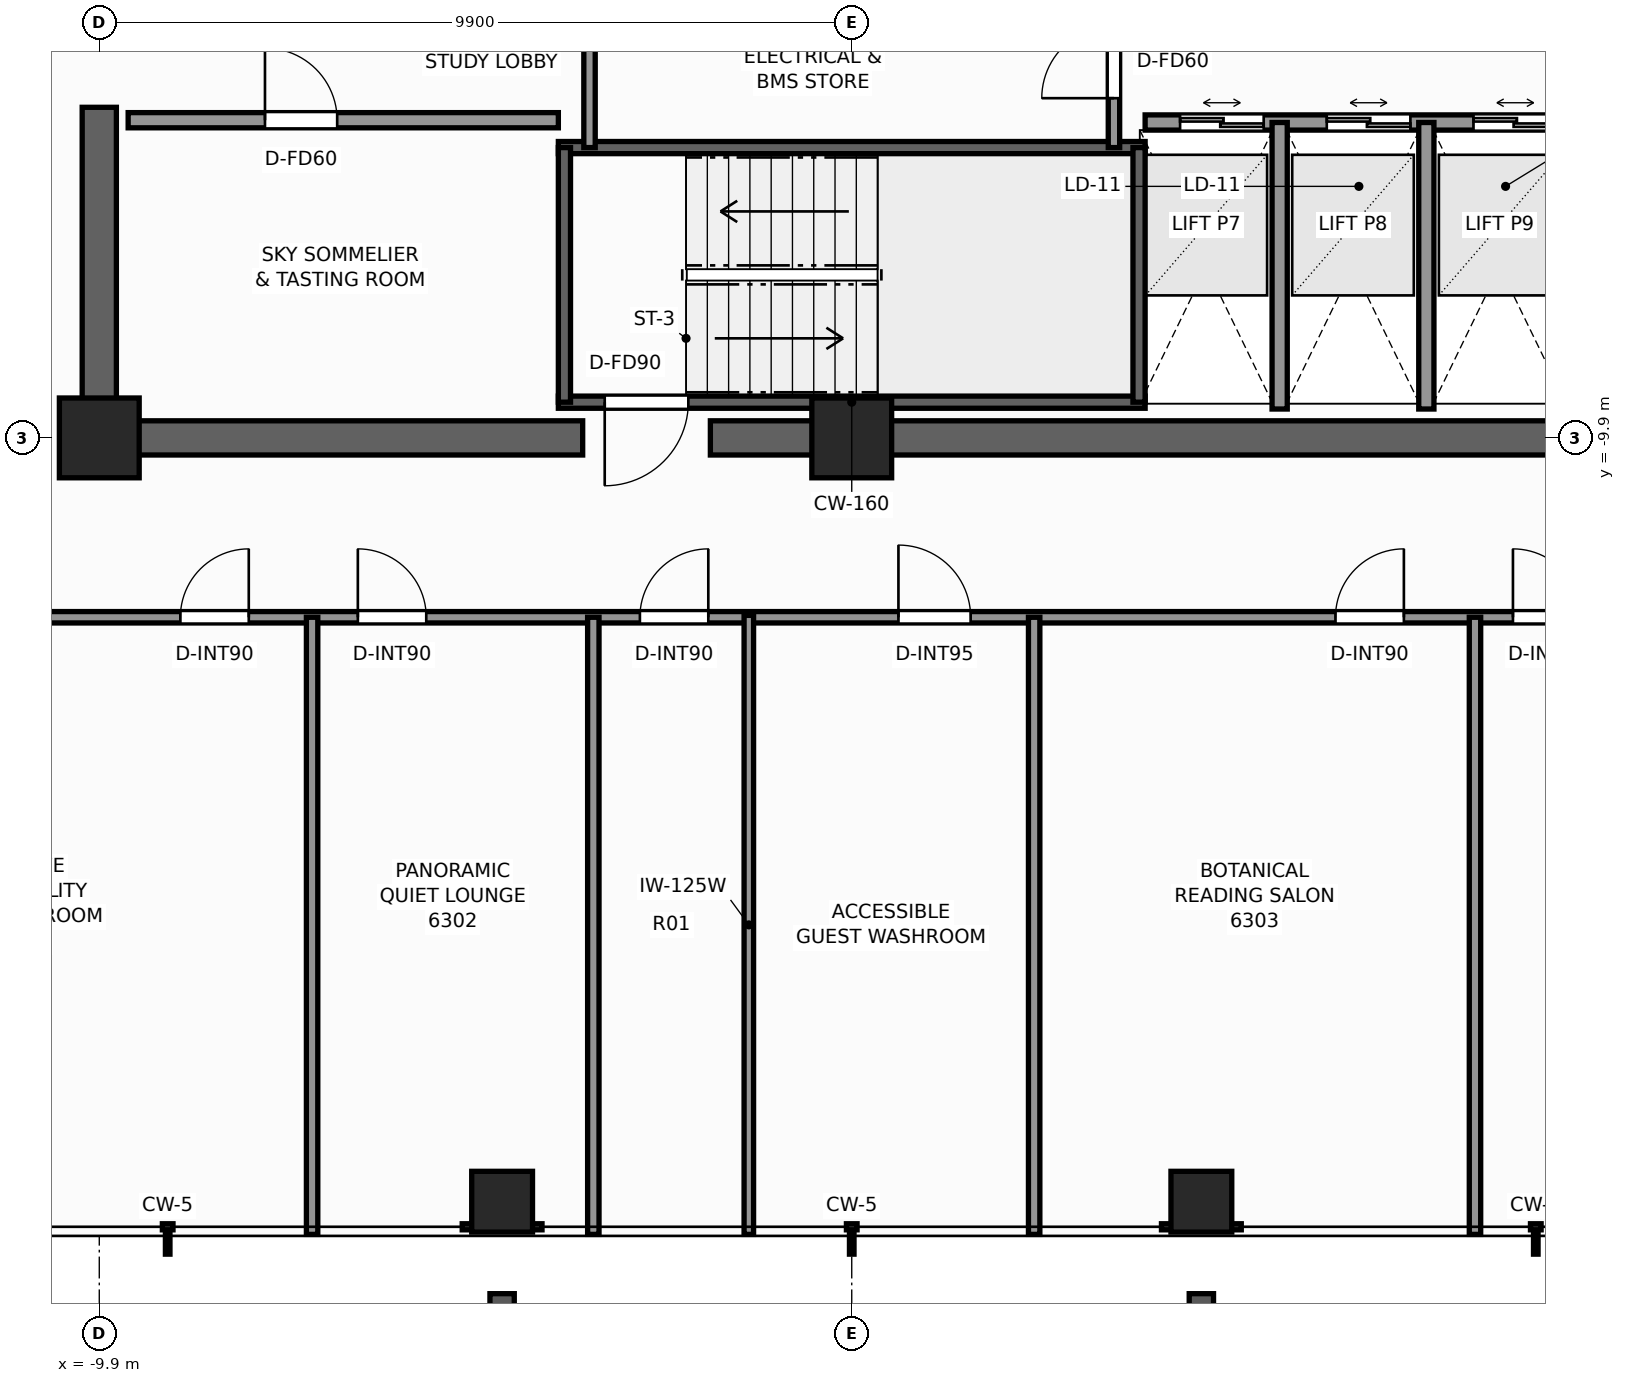
"""IFC4 building model, lengths in metres.
Left out: names, types, materials, properties, quantities, classifications, styles, units other than length and angle.
Written with IfcOpenShell. Run it as: python <this file> out.ifc"""

import sys

from ifc_helpers import new_model, si_unit, direction, frame, frame_2d, origin, origin_2d, place, context, subcontext, project, spatial, rectangle, extrude, element, fill, save


model = new_model("IFC4")
c1 = context("Model", 3, precision=1e-05, world=origin(), true_north=direction((0.0, 1.0)))
c2 = subcontext(c1, "Body", "Model", "MODEL_VIEW")
j1 = project(units=[si_unit("LENGTHUNIT", "METRE"), si_unit("PLANEANGLEUNIT", "RADIAN")], contexts=[c1])
p1 = place(None, origin())
s1 = spatial("IfcSite", under=j1, at=p1, CompositionType="ELEMENT")
p2 = place(p1, origin())
s2 = spatial("IfcBuilding", under=s1, at=p2, CompositionType="ELEMENT")
p3 = place(p2, frame((0.0, 0.0, 216.3)))
s3 = spatial("IfcBuildingStorey", under=s2, at=p3, CompositionType="ELEMENT", Elevation=216.3)
p4 = place(p3, frame((10.125, -9.9, 0.0), z_axis=(0.0, 0.0, 1.0), x_axis=(-1.0, 0.0, 0.0)))
e1 = element("IfcWall", 1, at=p4, inside=s3, PredefinedType="SHEAR", context=c2, shape_type="SweptSolid", body=[
    extrude(rectangle(XDim=11.985, YDim=0.45, at=frame_2d((5.993, 0.0))), origin(), (0.0, 0.0, 1.0), 3.3),
])
p5 = place(p3, frame((-3.54, -9.9, 0.0), z_axis=(0.0, 0.0, 1.0), x_axis=(-1.0, 0.0, 0.0)))
e2 = element("IfcWall", 2, at=p5, inside=s3, PredefinedType="SHEAR", context=c2, shape_type="SweptSolid", body=[
    extrude(rectangle(XDim=6.585, YDim=0.45, at=frame_2d((3.292, 0.0))), origin(), (0.0, 0.0, 1.0), 3.3),
])
p6 = place(p3, frame((-9.9, -9.675, 0.0), z_axis=(0.0, 0.0, 1.0), x_axis=(0.0, 1.0, 0.0)))
e3 = element("IfcWall", 3, at=p6, inside=s3, PredefinedType="SHEAR", context=c2, shape_type="SweptSolid", body=[
    extrude(rectangle(XDim=4.125, YDim=0.45, at=frame_2d((2.062, 0.0))), origin(), (0.0, 0.0, 1.0), 3.3),
])
for number, where, z_axis, x_axis in (
    (4, (-9.9, -9.9, 0.0), (0.0, 0.0, 1.0), (1.0, 0.0, 0.0)),
    (5, (0.0, -9.9, 0.0), (0.0, 0.0, 1.0), (1.0, 0.0, 0.0)),
):
    element("IfcColumn", number, at=place(p3, frame(where, z_axis=z_axis, x_axis=x_axis)), inside=s3, PredefinedType="COLUMN", context=c2, shape_type="SweptSolid", body=[
        extrude(rectangle(XDim=1.05, YDim=1.05, at=origin_2d()), origin(), (0.0, 0.0, 1.0), 3.3),
    ])
for number, where, z_axis, x_axis in (
    (6, (-4.6, -19.95, 0.0), (0.0, 0.0, 1.0), (1.0, 0.0, 0.0)),
    (7, (4.6, -19.95, 0.0), (0.0, 0.0, 1.0), (1.0, 0.0, 0.0)),
):
    element("IfcColumn", number, at=place(p3, frame(where, z_axis=z_axis, x_axis=x_axis)), inside=s3, PredefinedType="COLUMN", context=c2, shape_type="SweptSolid", body=[
        extrude(rectangle(XDim=0.8, YDim=0.8, at=origin_2d()), origin(), (0.0, 0.0, 1.0), 3.3),
    ])
p7 = place(p3, frame((3.86, -9.43, 0.0), z_axis=(0.0, 0.0, 1.0), x_axis=(-1.0, 0.0, 0.0)))
e8 = element("IfcWall", 8, at=p7, inside=s3, PredefinedType="SHEAR", context=c2, shape_type="SweptSolid", body=[
    extrude(rectangle(XDim=7.72, YDim=0.16, at=frame_2d((3.86, 0.0))), origin(), (0.0, 0.0, 1.0), 3.3),
])
p8 = place(p7, frame((6.01, 0.0, 0.0)))
e9 = element("IfcOpeningElement", 9, at=p8, cuts=e8, PredefinedType="OPENING", context=c2, shape_type="SweptSolid", body=[
    extrude(rectangle(XDim=1.1, YDim=2.2, at=frame_2d((0.55, 1.1))), frame((0.0, 0.09, 0.0), z_axis=(0.0, -1.0, 0.0), x_axis=(1.0, 0.0, 0.0)), (0.0, 0.0, 1.0), 0.18),
])
p9 = place(p3, frame((-3.86, -6.08, 0.0), z_axis=(0.0, 0.0, 1.0), x_axis=(1.0, 0.0, 0.0)))
e10 = element("IfcWall", 10, at=p9, inside=s3, PredefinedType="SHEAR", context=c2, shape_type="SweptSolid", body=[
    extrude(rectangle(XDim=7.72, YDim=0.16, at=frame_2d((3.86, 0.0))), origin(), (0.0, 0.0, 1.0), 3.3),
])
for number, where, z_axis, x_axis in (
    (11, (-3.78, -9.43, 0.0), (0.0, 0.0, 1.0), (0.0, 1.0, 0.0)),
    (12, (3.78, -9.43, 0.0), (0.0, 0.0, 1.0), (0.0, 1.0, 0.0)),
):
    element("IfcWall", number, at=place(p3, frame(where, z_axis=z_axis, x_axis=x_axis)), inside=s3, PredefinedType="SHEAR", context=c2, shape_type="SweptSolid", body=[
        extrude(rectangle(XDim=3.35, YDim=0.16, at=frame_2d((1.675, 0.0))), origin(), (0.0, 0.0, 1.0), 3.3),
    ])
p10 = place(p3, frame((-9.52, -5.72, 0.0), z_axis=(0.0, 0.0, 1.0), x_axis=(1.0, 0.0, 0.0)))
e13 = element("IfcWall", 13, at=p10, inside=s3, PredefinedType="SOLIDWALL", context=c2, shape_type="SweptSolid", body=[
    extrude(rectangle(XDim=5.66, YDim=0.2, at=frame_2d((2.83, 0.0))), origin(), (0.0, 0.0, 1.0), 3.08),
])
p11 = place(p10, frame((1.8, 0.0, 0.0)))
e14 = element("IfcOpeningElement", 14, at=p11, cuts=e13, PredefinedType="OPENING", context=c2, shape_type="SweptSolid", body=[
    extrude(rectangle(XDim=0.95, YDim=2.06, at=frame_2d((0.475, 1.03))), frame((0.0, 0.11, 0.0), z_axis=(0.0, -1.0, 0.0), x_axis=(1.0, 0.0, 0.0)), (0.0, 0.0, 1.0), 0.22),
])
p12 = place(p3, frame((3.86, -5.75, 0.0), z_axis=(0.0, 0.0, 1.0), x_axis=(1.0, 0.0, 0.0)))
e15 = element("IfcWall", 15, at=p12, inside=s3, PredefinedType="SOLIDWALL", context=c2, shape_type="SweptSolid", body=[
    extrude(rectangle(XDim=5.66, YDim=0.2, at=frame_2d((2.83, 0.0))), origin(), (0.0, 0.0, 1.0), 3.08),
])
p13 = place(p12, frame((0.46, 0.0, 0.0)))
e16 = element("IfcOpeningElement", 16, at=p13, cuts=e15, PredefinedType="OPENING", context=c2, shape_type="SweptSolid", body=[
    extrude(rectangle(XDim=1.1, YDim=2.2, at=frame_2d((0.55, 1.1))), frame((0.0, 0.11, 0.0), z_axis=(0.0, -1.0, 0.0), x_axis=(1.0, 0.0, 0.0)), (0.0, 0.0, 1.0), 0.22),
])
p14 = place(p12, frame((2.39, 0.0, 0.0)))
e17 = element("IfcOpeningElement", 17, at=p14, cuts=e15, PredefinedType="OPENING", context=c2, shape_type="SweptSolid", body=[
    extrude(rectangle(XDim=1.1, YDim=2.2, at=frame_2d((0.55, 1.1))), frame((0.0, 0.11, 0.0), z_axis=(0.0, -1.0, 0.0), x_axis=(1.0, 0.0, 0.0)), (0.0, 0.0, 1.0), 0.22),
])
p15 = place(p12, frame((4.32, 0.0, 0.0)))
e18 = element("IfcOpeningElement", 18, at=p15, cuts=e15, PredefinedType="OPENING", context=c2, shape_type="SweptSolid", body=[
    extrude(rectangle(XDim=1.1, YDim=2.2, at=frame_2d((0.55, 1.1))), frame((0.0, 0.11, 0.0), z_axis=(0.0, -1.0, 0.0), x_axis=(1.0, 0.0, 0.0)), (0.0, 0.0, 1.0), 0.22),
])
for number, where, z_axis, x_axis in (
    (19, (5.63, -9.52, 0.0), (0.0, 0.0, 1.0), (0.0, 1.0, 0.0)),
    (20, (7.56, -9.52, 0.0), (0.0, 0.0, 1.0), (0.0, 1.0, 0.0)),
):
    element("IfcWall", number, at=place(p3, frame(where, z_axis=z_axis, x_axis=x_axis)), inside=s3, PredefinedType="SOLIDWALL", context=c2, shape_type="SweptSolid", body=[
        extrude(rectangle(XDim=3.77, YDim=0.2, at=frame_2d((1.885, 0.0))), origin(), (0.0, 0.0, 1.0), 3.08),
    ])
p16 = place(p3, frame((3.45, -6.08, 0.0), z_axis=(0.0, 0.0, 1.0), x_axis=(0.0, 1.0, 0.0)))
e21 = element("IfcWall", 21, at=p16, inside=s3, PredefinedType="PARTITIONING", context=c2, shape_type="SweptSolid", body=[
    extrude(rectangle(XDim=2.36, YDim=0.15, at=frame_2d((1.18, 0.0))), origin(), (0.0, 0.0, 1.0), 3.08),
])
p17 = place(p16, frame((0.65, 0.0, 0.0)))
e22 = element("IfcOpeningElement", 22, at=p17, cuts=e21, PredefinedType="OPENING", context=c2, shape_type="SweptSolid", body=[
    extrude(rectangle(XDim=0.95, YDim=2.06, at=frame_2d((0.475, 1.03))), frame((0.0, 0.085, 0.0), z_axis=(0.0, -1.0, 0.0), x_axis=(1.0, 0.0, 0.0)), (0.0, 0.0, 1.0), 0.17),
])
p18 = place(p3, frame((-3.45, -6.08, 0.0), z_axis=(0.0, 0.0, 1.0), x_axis=(0.0, 1.0, 0.0)))
e23 = element("IfcWall", 23, at=p18, inside=s3, PredefinedType="PARTITIONING", context=c2, shape_type="SweptSolid", body=[
    extrude(rectangle(XDim=2.36, YDim=0.15, at=frame_2d((1.18, 0.0))), origin(), (0.0, 0.0, 1.0), 3.08),
])
p19 = place(p3, frame((-12.26, -12.26, 0.0), z_axis=(0.0, 0.0, 1.0), x_axis=(1.0, 0.0, 0.0)))
e24 = element("IfcWall", 24, at=p19, inside=s3, PredefinedType="PARTITIONING", context=c2, shape_type="SweptSolid", body=[
    extrude(rectangle(XDim=24.52, YDim=0.15, at=frame_2d((12.26, 0.0))), origin(), (0.0, 0.0, 1.0), 2.369),
])
p20 = place(p19, frame((3.427, 0.0, 0.0)))
e25 = element("IfcOpeningElement", 25, at=p20, cuts=e24, PredefinedType="OPENING", context=c2, shape_type="SweptSolid", body=[
    extrude(rectangle(XDim=0.9, YDim=2.06, at=frame_2d((0.45, 1.03))), frame((0.0, 0.085, 0.0), z_axis=(0.0, -1.0, 0.0), x_axis=(1.0, 0.0, 0.0)), (0.0, 0.0, 1.0), 0.17),
])
p21 = place(p19, frame((5.762, 0.0, 0.0)))
e26 = element("IfcOpeningElement", 26, at=p21, cuts=e24, PredefinedType="OPENING", context=c2, shape_type="SweptSolid", body=[
    extrude(rectangle(XDim=0.9, YDim=2.06, at=frame_2d((0.45, 1.03))), frame((0.0, 0.085, 0.0), z_axis=(0.0, -1.0, 0.0), x_axis=(1.0, 0.0, 0.0)), (0.0, 0.0, 1.0), 0.17),
])
p22 = place(p19, frame((9.473, 0.0, 0.0)))
e27 = element("IfcOpeningElement", 27, at=p22, cuts=e24, PredefinedType="OPENING", context=c2, shape_type="SweptSolid", body=[
    extrude(rectangle(XDim=0.9, YDim=2.06, at=frame_2d((0.45, 1.03))), frame((0.0, 0.085, 0.0), z_axis=(0.0, -1.0, 0.0), x_axis=(1.0, 0.0, 0.0)), (0.0, 0.0, 1.0), 0.17),
])
p23 = place(p19, frame((12.875, 0.0, 0.0)))
e28 = element("IfcOpeningElement", 28, at=p23, cuts=e24, PredefinedType="OPENING", context=c2, shape_type="SweptSolid", body=[
    extrude(rectangle(XDim=0.95, YDim=2.06, at=frame_2d((0.475, 1.03))), frame((0.0, 0.085, 0.0), z_axis=(0.0, -1.0, 0.0), x_axis=(1.0, 0.0, 0.0)), (0.0, 0.0, 1.0), 0.17),
])
p24 = place(p19, frame((18.625, 0.0, 0.0)))
e29 = element("IfcOpeningElement", 29, at=p24, cuts=e24, PredefinedType="OPENING", context=c2, shape_type="SweptSolid", body=[
    extrude(rectangle(XDim=0.9, YDim=2.06, at=frame_2d((0.45, 1.03))), frame((0.0, 0.085, 0.0), z_axis=(0.0, -1.0, 0.0), x_axis=(1.0, 0.0, 0.0)), (0.0, 0.0, 1.0), 0.17),
])
p25 = place(p19, frame((20.959, 0.0, 0.0)))
e30 = element("IfcOpeningElement", 30, at=p25, cuts=e24, PredefinedType="OPENING", context=c2, shape_type="SweptSolid", body=[
    extrude(rectangle(XDim=0.9, YDim=2.06, at=frame_2d((0.45, 1.03))), frame((0.0, 0.085, 0.0), z_axis=(0.0, -1.0, 0.0), x_axis=(1.0, 0.0, 0.0)), (0.0, 0.0, 1.0), 0.17),
])
for number, where, z_axis, x_axis in (
    (31, (-7.1, -20.38, 0.0), (0.0, 0.0, 1.0), (0.0, 1.0, 0.0)),
    (32, (-3.4, -20.38, 0.0), (0.0, 0.0, 1.0), (0.0, 1.0, 0.0)),
    (33, (2.4, -20.38, 0.0), (0.0, 0.0, 1.0), (0.0, 1.0, 0.0)),
):
    element("IfcWall", number, at=place(p3, frame(where, z_axis=z_axis, x_axis=x_axis)), inside=s3, PredefinedType="PARTITIONING", context=c2, shape_type="SweptSolid", body=[
        extrude(rectangle(XDim=8.12, YDim=0.15, at=frame_2d((4.06, 0.0))), origin(), (0.0, 0.0, 1.0), 2.453),
    ])
p26 = place(p3, frame((-1.354, -20.38, 0.0), z_axis=(0.0, 0.0, 1.0), x_axis=(0.0, 1.0, 0.0)))
e34 = element("IfcWall", 34, at=p26, inside=s3, PredefinedType="PARTITIONING", context=c2, shape_type="SweptSolid", body=[
    extrude(rectangle(XDim=8.145, YDim=0.125, at=frame_2d((4.072, 0.0))), origin(), (0.0, 0.0, 1.0), 2.453),
])
p27 = place(p3, frame((8.2, -20.38, 0.0), z_axis=(0.0, 0.0, 1.0), x_axis=(0.0, 1.0, 0.0)))
e35 = element("IfcWall", 35, at=p27, inside=s3, PredefinedType="PARTITIONING", context=c2, shape_type="SweptSolid", body=[
    extrude(rectangle(XDim=8.12, YDim=0.15, at=frame_2d((4.06, 0.0))), origin(), (0.0, 0.0, 1.0), 2.453),
])
p28 = place(p8, origin())
e36 = element("IfcDoor", 36, at=p28, inside=s3, OperationType="SINGLE_SWING_RIGHT", PredefinedType="DOOR", context=c2, shape_type="SweptSolid", body=[
    extrude(rectangle(XDim=1.1, YDim=2.2, at=frame_2d((0.55, 1.1))), frame((0.0, 0.025, 0.0), z_axis=(0.0, -1.0, 0.0), x_axis=(1.0, 0.0, 0.0)), (0.0, 0.0, 1.0), 0.05),
])
fill(e9, e36)
p29 = place(p11, origin())
e37 = element("IfcDoor", 37, at=p29, inside=s3, OperationType="SINGLE_SWING_LEFT", PredefinedType="DOOR", context=c2, shape_type="SweptSolid", body=[
    extrude(rectangle(XDim=0.95, YDim=2.06, at=frame_2d((0.475, 1.03))), frame((0.0, 0.025, 0.0), z_axis=(0.0, -1.0, 0.0), x_axis=(1.0, 0.0, 0.0)), (0.0, 0.0, 1.0), 0.05),
])
fill(e14, e37)
p30 = place(p13, origin())
e38 = element("IfcDoor", 38, at=p30, inside=s3, OperationType="DOUBLE_DOOR_SLIDING", PredefinedType="DOOR", context=c2, shape_type="SweptSolid", body=[
    extrude(rectangle(XDim=1.1, YDim=2.2, at=frame_2d((0.55, 1.1))), frame((0.0, 0.025, 0.0), z_axis=(0.0, -1.0, 0.0), x_axis=(1.0, 0.0, 0.0)), (0.0, 0.0, 1.0), 0.05),
])
fill(e16, e38)
p31 = place(p14, origin())
e39 = element("IfcDoor", 39, at=p31, inside=s3, OperationType="DOUBLE_DOOR_SLIDING", PredefinedType="DOOR", context=c2, shape_type="SweptSolid", body=[
    extrude(rectangle(XDim=1.1, YDim=2.2, at=frame_2d((0.55, 1.1))), frame((0.0, 0.025, 0.0), z_axis=(0.0, -1.0, 0.0), x_axis=(1.0, 0.0, 0.0)), (0.0, 0.0, 1.0), 0.05),
])
fill(e17, e39)
p32 = place(p15, origin())
e40 = element("IfcDoor", 40, at=p32, inside=s3, OperationType="DOUBLE_DOOR_SLIDING", PredefinedType="DOOR", context=c2, shape_type="SweptSolid", body=[
    extrude(rectangle(XDim=1.1, YDim=2.2, at=frame_2d((0.55, 1.1))), frame((0.0, 0.025, 0.0), z_axis=(0.0, -1.0, 0.0), x_axis=(1.0, 0.0, 0.0)), (0.0, 0.0, 1.0), 0.05),
])
fill(e18, e40)
p33 = place(p17, origin())
e41 = element("IfcDoor", 41, at=p33, inside=s3, OperationType="SINGLE_SWING_LEFT", PredefinedType="DOOR", context=c2, shape_type="SweptSolid", body=[
    extrude(rectangle(XDim=0.95, YDim=2.06, at=frame_2d((0.475, 1.03))), frame((0.0, 0.025, 0.0), z_axis=(0.0, -1.0, 0.0), x_axis=(1.0, 0.0, 0.0)), (0.0, 0.0, 1.0), 0.05),
])
fill(e22, e41)
p34 = place(p20, origin())
e42 = element("IfcDoor", 42, at=p34, inside=s3, OperationType="SINGLE_SWING_RIGHT", PredefinedType="DOOR", context=c2, shape_type="SweptSolid", body=[
    extrude(rectangle(XDim=0.9, YDim=2.06, at=frame_2d((0.45, 1.03))), frame((0.0, 0.025, 0.0), z_axis=(0.0, -1.0, 0.0), x_axis=(1.0, 0.0, 0.0)), (0.0, 0.0, 1.0), 0.05),
])
fill(e25, e42)
p35 = place(p21, origin())
e43 = element("IfcDoor", 43, at=p35, inside=s3, OperationType="SINGLE_SWING_LEFT", PredefinedType="DOOR", context=c2, shape_type="SweptSolid", body=[
    extrude(rectangle(XDim=0.9, YDim=2.06, at=frame_2d((0.45, 1.03))), frame((0.0, 0.025, 0.0), z_axis=(0.0, -1.0, 0.0), x_axis=(1.0, 0.0, 0.0)), (0.0, 0.0, 1.0), 0.05),
])
fill(e26, e43)
p36 = place(p22, origin())
e44 = element("IfcDoor", 44, at=p36, inside=s3, OperationType="SINGLE_SWING_RIGHT", PredefinedType="DOOR", context=c2, shape_type="SweptSolid", body=[
    extrude(rectangle(XDim=0.9, YDim=2.06, at=frame_2d((0.45, 1.03))), frame((0.0, 0.025, 0.0), z_axis=(0.0, -1.0, 0.0), x_axis=(1.0, 0.0, 0.0)), (0.0, 0.0, 1.0), 0.05),
])
fill(e27, e44)
p37 = place(p23, origin())
e45 = element("IfcDoor", 45, at=p37, inside=s3, OperationType="SINGLE_SWING_LEFT", PredefinedType="DOOR", context=c2, shape_type="SweptSolid", body=[
    extrude(rectangle(XDim=0.95, YDim=2.06, at=frame_2d((0.475, 1.03))), frame((0.0, 0.025, 0.0), z_axis=(0.0, -1.0, 0.0), x_axis=(1.0, 0.0, 0.0)), (0.0, 0.0, 1.0), 0.05),
])
fill(e28, e45)
p38 = place(p24, origin())
e46 = element("IfcDoor", 46, at=p38, inside=s3, OperationType="SINGLE_SWING_RIGHT", PredefinedType="DOOR", context=c2, shape_type="SweptSolid", body=[
    extrude(rectangle(XDim=0.9, YDim=2.06, at=frame_2d((0.45, 1.03))), frame((0.0, 0.025, 0.0), z_axis=(0.0, -1.0, 0.0), x_axis=(1.0, 0.0, 0.0)), (0.0, 0.0, 1.0), 0.05),
])
fill(e29, e46)
p39 = place(p25, origin())
e47 = element("IfcDoor", 47, at=p39, inside=s3, OperationType="SINGLE_SWING_LEFT", PredefinedType="DOOR", context=c2, shape_type="SweptSolid", body=[
    extrude(rectangle(XDim=0.9, YDim=2.06, at=frame_2d((0.45, 1.03))), frame((0.0, 0.025, 0.0), z_axis=(0.0, -1.0, 0.0), x_axis=(1.0, 0.0, 0.0)), (0.0, 0.0, 1.0), 0.05),
])
fill(e30, e47)
save(model, sys.argv[1])
